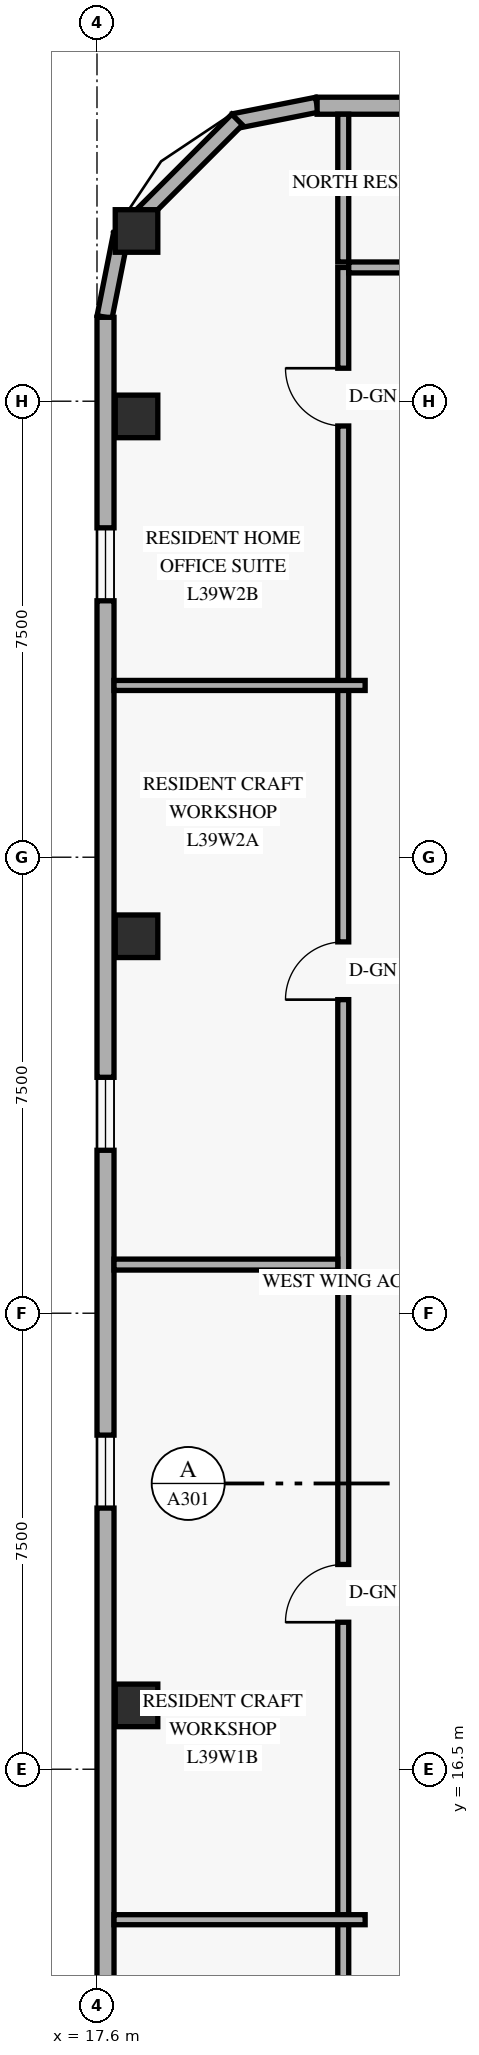
"""IFC4 building model, lengths in metres.
Left out: names, types, materials, properties, quantities, classifications, styles, units other than length and angle.
Written with IfcOpenShell. Run it as: python <this file> out.ifc"""

import sys

from ifc_helpers import new_model, si_unit, direction, frame, frame_2d, origin, origin_2d, place, context, subcontext, project, spatial, rectangle, extrude, element, fill, save


model = new_model("IFC4")
c1 = context("Model", 3, precision=1e-05, world=origin(), true_north=direction((0.0, 1.0)))
c2 = subcontext(c1, "Body", "Model", "MODEL_VIEW")
j1 = project(units=[si_unit("LENGTHUNIT", "METRE"), si_unit("PLANEANGLEUNIT", "RADIAN")], contexts=[c1])
p1 = place(None, origin())
s1 = spatial("IfcSite", under=j1, at=p1, CompositionType="ELEMENT")
p2 = place(p1, origin())
s2 = spatial("IfcBuilding", under=s1, at=p2, CompositionType="ELEMENT")
p3 = place(p2, frame((0.0, 0.0, 151.8)))
s3 = spatial("IfcBuildingStorey", under=s2, at=p3, CompositionType="ELEMENT", Elevation=151.8)
for number, where, z_axis, x_axis in (
    (1, (18.25, 17.55, 0.0), (0.0, 0.0, 1.0), (1.0, 0.0, 0.0)),
    (2, (18.25, 30.2, 0.0), (0.0, 0.0, 1.0), (1.0, 0.0, 0.0)),
    (3, (18.25, 38.75, 0.0), (0.0, 0.0, 1.0), (1.0, 0.0, 0.0)),
    (4, (18.25, 41.8, 0.0), (0.0, 0.0, 1.0), (1.0, 0.0, 0.0)),
):
    element("IfcColumn", number, at=place(p3, frame(where, z_axis=z_axis, x_axis=x_axis)), inside=s3, PredefinedType="COLUMN", context=c2, shape_type="SweptSolid", body=[
        extrude(rectangle(XDim=0.7, YDim=0.7, at=origin_2d()), origin(), (0.0, 0.0, 1.0), 3.6),
    ])
p4 = place(p3, frame((21.217, 43.876, 0.0), z_axis=(0.0, 0.0, 1.0), x_axis=(-0.980809899341, -0.19496651342, 0.0)))
e5 = element("IfcWall", 5, at=p4, inside=s3, PredefinedType="SOLIDWALL", context=c2, shape_type="SweptSolid", body=[
    extrude(rectangle(XDim=1.389, YDim=0.25, at=frame_2d((0.694, 0.0))), origin(), (0.0, 0.0, 1.0), 3.36),
])
p5 = place(p3, frame((19.905, 43.632, 0.0), z_axis=(0.0, 0.0, 1.0), x_axis=(-0.707106781187, -0.707106781187, 0.0)))
e6 = element("IfcWall", 6, at=p5, inside=s3, PredefinedType="SOLIDWALL", context=c2, shape_type="SweptSolid", body=[
    extrude(rectangle(XDim=2.739, YDim=0.25, at=frame_2d((1.37, 0.0))), origin(), (0.0, 0.0, 1.0), 3.36),
])
p6 = place(p3, frame((17.995, 41.746, 0.0), z_axis=(0.0, 0.0, 1.0), x_axis=(-0.195135625965, -0.9807762678, 0.0)))
e7 = element("IfcWall", 7, at=p6, inside=s3, PredefinedType="SOLIDWALL", context=c2, shape_type="SweptSolid", body=[
    extrude(rectangle(XDim=1.389, YDim=0.25, at=frame_2d((0.694, 0.0))), origin(), (0.0, 0.0, 1.0), 3.36),
])
p7 = place(p3, frame((54.98, 43.86, 0.0), z_axis=(0.0, 0.0, 1.0), x_axis=(-1.0, 0.0, 0.0)))
e8 = element("IfcWall", 8, at=p7, inside=s3, PredefinedType="SOLIDWALL", context=c2, shape_type="SweptSolid", body=[
    extrude(rectangle(XDim=33.76, YDim=0.28, at=frame_2d((16.88, 0.0))), origin(), (0.0, 0.0, 1.0), 3.36),
])
p8 = place(p7, frame((28.055, 0.0, 0.85)))
e9 = element("IfcOpeningElement", 9, at=p8, cuts=e8, PredefinedType="OPENING", context=c2, shape_type="SweptSolid", body=[
    extrude(rectangle(XDim=1.8, YDim=1.6, at=frame_2d((0.9, 0.8))), frame((0.0, 0.15, 0.0), z_axis=(0.0, -1.0, 0.0), x_axis=(1.0, 0.0, 0.0)), (0.0, 0.0, 1.0), 0.3),
])
p9 = place(p7, frame((21.17, 0.0, 0.85)))
e10 = element("IfcOpeningElement", 10, at=p9, cuts=e8, PredefinedType="OPENING", context=c2, shape_type="SweptSolid", body=[
    extrude(rectangle(XDim=1.8, YDim=1.6, at=frame_2d((0.9, 0.8))), frame((0.0, 0.15, 0.0), z_axis=(0.0, -1.0, 0.0), x_axis=(1.0, 0.0, 0.0)), (0.0, 0.0, 1.0), 0.3),
])
p10 = place(p7, frame((14.865, 0.0, 0.85)))
e11 = element("IfcOpeningElement", 11, at=p10, cuts=e8, PredefinedType="OPENING", context=c2, shape_type="SweptSolid", body=[
    extrude(rectangle(XDim=1.8, YDim=1.6, at=frame_2d((0.9, 0.8))), frame((0.0, 0.15, 0.0), z_axis=(0.0, -1.0, 0.0), x_axis=(1.0, 0.0, 0.0)), (0.0, 0.0, 1.0), 0.3),
])
p11 = place(p7, frame((8.575, 0.0, 0.85)))
e12 = element("IfcOpeningElement", 12, at=p11, cuts=e8, PredefinedType="OPENING", context=c2, shape_type="SweptSolid", body=[
    extrude(rectangle(XDim=1.8, YDim=1.6, at=frame_2d((0.9, 0.8))), frame((0.0, 0.15, 0.0), z_axis=(0.0, -1.0, 0.0), x_axis=(1.0, 0.0, 0.0)), (0.0, 0.0, 1.0), 0.3),
])
p12 = place(p7, frame((5.48, 0.0, 0.85)))
e13 = element("IfcOpeningElement", 13, at=p12, cuts=e8, PredefinedType="OPENING", context=c2, shape_type="SweptSolid", body=[
    extrude(rectangle(XDim=1.2, YDim=1.5, at=frame_2d((0.6, 0.75))), frame((0.0, 0.15, 0.0), z_axis=(0.0, -1.0, 0.0), x_axis=(1.0, 0.0, 0.0)), (0.0, 0.0, 1.0), 0.3),
])
p13 = place(p7, frame((1.69, 0.0, 0.85)))
e14 = element("IfcOpeningElement", 14, at=p13, cuts=e8, PredefinedType="OPENING", context=c2, shape_type="SweptSolid", body=[
    extrude(rectangle(XDim=1.8, YDim=1.6, at=frame_2d((0.9, 0.8))), frame((0.0, 0.15, 0.0), z_axis=(0.0, -1.0, 0.0), x_axis=(1.0, 0.0, 0.0)), (0.0, 0.0, 1.0), 0.3),
])
p14 = place(p3, frame((17.74, 40.38, 0.0), z_axis=(0.0, 0.0, 1.0), x_axis=(0.0, -1.0, 0.0)))
e15 = element("IfcWall", 15, at=p14, inside=s3, PredefinedType="SOLIDWALL", context=c2, shape_type="SweptSolid", body=[
    extrude(rectangle(XDim=32.76, YDim=0.28, at=frame_2d((16.38, 0.0))), origin(), (0.0, 0.0, 1.0), 3.36),
])
p15 = place(p14, frame((27.923, 0.0, 0.85)))
e16 = element("IfcOpeningElement", 16, at=p15, cuts=e15, PredefinedType="OPENING", context=c2, shape_type="SweptSolid", body=[
    extrude(rectangle(XDim=1.2, YDim=1.5, at=frame_2d((0.6, 0.75))), frame((0.0, 0.15, 0.0), z_axis=(0.0, -1.0, 0.0), x_axis=(1.0, 0.0, 0.0)), (0.0, 0.0, 1.0), 0.3),
])
p16 = place(p14, frame((18.385, 0.0, 0.85)))
e17 = element("IfcOpeningElement", 17, at=p16, cuts=e15, PredefinedType="OPENING", context=c2, shape_type="SweptSolid", body=[
    extrude(rectangle(XDim=1.2, YDim=1.5, at=frame_2d((0.6, 0.75))), frame((0.0, 0.15, 0.0), z_axis=(0.0, -1.0, 0.0), x_axis=(1.0, 0.0, 0.0)), (0.0, 0.0, 1.0), 0.3),
])
p17 = place(p14, frame((12.5, 0.0, 0.85)))
e18 = element("IfcOpeningElement", 18, at=p17, cuts=e15, PredefinedType="OPENING", context=c2, shape_type="SweptSolid", body=[
    extrude(rectangle(XDim=1.2, YDim=1.5, at=frame_2d((0.6, 0.75))), frame((0.0, 0.15, 0.0), z_axis=(0.0, -1.0, 0.0), x_axis=(1.0, 0.0, 0.0)), (0.0, 0.0, 1.0), 0.3),
])
p18 = place(p14, frame((3.462, 0.0, 0.85)))
e19 = element("IfcOpeningElement", 19, at=p18, cuts=e15, PredefinedType="OPENING", context=c2, shape_type="SweptSolid", body=[
    extrude(rectangle(XDim=1.2, YDim=1.5, at=frame_2d((0.6, 0.75))), frame((0.0, 0.15, 0.0), z_axis=(0.0, -1.0, 0.0), x_axis=(1.0, 0.0, 0.0)), (0.0, 0.0, 1.0), 0.3),
])
p19 = place(p3, frame((21.65, 6.8, 0.0), z_axis=(0.0, 0.0, 1.0), x_axis=(0.0, 1.0, 0.0)))
e20 = element("IfcWall", 20, at=p19, inside=s3, PredefinedType="STANDARD", context=c2, shape_type="SweptSolid", body=[
    extrude(rectangle(XDim=34.4, YDim=0.18, at=frame_2d((17.2, 0.0))), origin(), (0.0, 0.0, 1.0), 2.73),
])
p20 = place(p19, frame((1.883, 0.0, 0.0)))
e21 = element("IfcOpeningElement", 21, at=p20, cuts=e20, PredefinedType="OPENING", context=c2, shape_type="SweptSolid", body=[
    extrude(rectangle(XDim=0.95, YDim=2.15, at=frame_2d((0.475, 1.075))), frame((0.0, 0.1, 0.0), z_axis=(0.0, -1.0, 0.0), x_axis=(1.0, 0.0, 0.0)), (0.0, 0.0, 1.0), 0.2),
])
p21 = place(p19, frame((12.117, 0.0, 0.0)))
e22 = element("IfcOpeningElement", 22, at=p21, cuts=e20, PredefinedType="OPENING", context=c2, shape_type="SweptSolid", body=[
    extrude(rectangle(XDim=0.95, YDim=2.15, at=frame_2d((0.475, 1.075))), frame((0.0, 0.1, 0.0), z_axis=(0.0, -1.0, 0.0), x_axis=(1.0, 0.0, 0.0)), (0.0, 0.0, 1.0), 0.2),
])
p22 = place(p19, frame((22.357, 0.0, 0.0)))
e23 = element("IfcOpeningElement", 23, at=p22, cuts=e20, PredefinedType="OPENING", context=c2, shape_type="SweptSolid", body=[
    extrude(rectangle(XDim=0.95, YDim=2.15, at=frame_2d((0.475, 1.075))), frame((0.0, 0.1, 0.0), z_axis=(0.0, -1.0, 0.0), x_axis=(1.0, 0.0, 0.0)), (0.0, 0.0, 1.0), 0.2),
])
p23 = place(p19, frame((31.792, 0.0, 0.0)))
e24 = element("IfcOpeningElement", 24, at=p23, cuts=e20, PredefinedType="OPENING", context=c2, shape_type="SweptSolid", body=[
    extrude(rectangle(XDim=0.95, YDim=2.15, at=frame_2d((0.475, 1.075))), frame((0.0, 0.1, 0.0), z_axis=(0.0, -1.0, 0.0), x_axis=(1.0, 0.0, 0.0)), (0.0, 0.0, 1.0), 0.2),
])
p24 = place(p3, frame((21.74, 41.2, 0.0), z_axis=(0.0, 0.0, 1.0), x_axis=(1.0, 0.0, 0.0)))
e25 = element("IfcWall", 25, at=p24, inside=s3, PredefinedType="STANDARD", context=c2, shape_type="SweptSolid", body=[
    extrude(rectangle(XDim=13.68, YDim=0.18, at=frame_2d((6.84, 0.0))), origin(), (0.0, 0.0, 1.0), 2.73),
])
p25 = place(p24, frame((2.95, 0.0, 0.0)))
e26 = element("IfcOpeningElement", 26, at=p25, cuts=e25, PredefinedType="OPENING", context=c2, shape_type="SweptSolid", body=[
    extrude(rectangle(XDim=0.95, YDim=2.15, at=frame_2d((0.475, 1.075))), frame((0.0, 0.1, 0.0), z_axis=(0.0, -1.0, 0.0), x_axis=(1.0, 0.0, 0.0)), (0.0, 0.0, 1.0), 0.2),
])
p26 = place(p24, frame((10.11, 0.0, 0.0)))
e27 = element("IfcOpeningElement", 27, at=p26, cuts=e25, PredefinedType="OPENING", context=c2, shape_type="SweptSolid", body=[
    extrude(rectangle(XDim=0.95, YDim=2.15, at=frame_2d((0.475, 1.075))), frame((0.0, 0.1, 0.0), z_axis=(0.0, -1.0, 0.0), x_axis=(1.0, 0.0, 0.0)), (0.0, 0.0, 1.0), 0.2),
])
p27 = place(p3, frame((21.65, 41.29, 0.0), z_axis=(0.0, 0.0, 1.0), x_axis=(0.0, 1.0, 0.0)))
e28 = element("IfcWall", 28, at=p27, inside=s3, PredefinedType="PARTITIONING", context=c2, shape_type="SweptSolid", body=[
    extrude(rectangle(XDim=2.43, YDim=0.18, at=frame_2d((1.215, 0.0))), origin(), (0.0, 0.0, 1.0), 2.879),
])
p28 = place(p3, frame((17.88, 14.025, 0.0), z_axis=(0.0, 0.0, 1.0), x_axis=(1.0, 0.0, 0.0)))
e29 = element("IfcWall", 29, at=p28, inside=s3, PredefinedType="PARTITIONING", context=c2, shape_type="SweptSolid", body=[
    extrude(rectangle(XDim=4.13, YDim=0.165, at=frame_2d((2.065, 0.0))), origin(), (0.0, 0.0, 1.0), 2.879),
])
p29 = place(p3, frame((17.88, 24.8, 0.0), z_axis=(0.0, 0.0, 1.0), x_axis=(1.0, 0.0, 0.0)))
e30 = element("IfcWall", 30, at=p29, inside=s3, PredefinedType="PARTITIONING", context=c2, shape_type="SweptSolid", body=[
    extrude(rectangle(XDim=3.68, YDim=0.18, at=frame_2d((1.84, 0.0))), origin(), (0.0, 0.0, 1.0), 2.879),
])
p30 = place(p3, frame((17.88, 34.325, 0.0), z_axis=(0.0, 0.0, 1.0), x_axis=(1.0, 0.0, 0.0)))
e31 = element("IfcWall", 31, at=p30, inside=s3, PredefinedType="PARTITIONING", context=c2, shape_type="SweptSolid", body=[
    extrude(rectangle(XDim=4.13, YDim=0.165, at=frame_2d((2.065, 0.0))), origin(), (0.0, 0.0, 1.0), 2.879),
])
p31 = place(p16, origin())
e32 = element("IfcWindow", 32, at=p31, inside=s3, PartitioningType="SINGLE_PANEL", PredefinedType="WINDOW", context=c2, shape_type="SweptSolid", body=[
    extrude(rectangle(XDim=1.2, YDim=1.5, at=frame_2d((0.6, 0.75))), frame((0.0, 0.03, 0.0), z_axis=(0.0, -1.0, 0.0), x_axis=(1.0, 0.0, 0.0)), (0.0, 0.0, 1.0), 0.06),
])
fill(e17, e32)
p32 = place(p17, origin())
e33 = element("IfcWindow", 33, at=p32, inside=s3, PartitioningType="SINGLE_PANEL", PredefinedType="WINDOW", context=c2, shape_type="SweptSolid", body=[
    extrude(rectangle(XDim=1.2, YDim=1.5, at=frame_2d((0.6, 0.75))), frame((0.0, 0.03, 0.0), z_axis=(0.0, -1.0, 0.0), x_axis=(1.0, 0.0, 0.0)), (0.0, 0.0, 1.0), 0.06),
])
fill(e18, e33)
p33 = place(p18, origin())
e34 = element("IfcWindow", 34, at=p33, inside=s3, PartitioningType="SINGLE_PANEL", PredefinedType="WINDOW", context=c2, shape_type="SweptSolid", body=[
    extrude(rectangle(XDim=1.2, YDim=1.5, at=frame_2d((0.6, 0.75))), frame((0.0, 0.03, 0.0), z_axis=(0.0, -1.0, 0.0), x_axis=(1.0, 0.0, 0.0)), (0.0, 0.0, 1.0), 0.06),
])
fill(e19, e34)
p34 = place(p21, origin())
e35 = element("IfcDoor", 35, at=p34, inside=s3, OperationType="SINGLE_SWING_LEFT", PredefinedType="DOOR", context=c2, shape_type="SweptSolid", body=[
    extrude(rectangle(XDim=0.95, YDim=2.15, at=frame_2d((0.475, 1.075))), frame((0.0, 0.025, 0.0), z_axis=(0.0, -1.0, 0.0), x_axis=(1.0, 0.0, 0.0)), (0.0, 0.0, 1.0), 0.05),
])
fill(e22, e35)
p35 = place(p22, origin())
e36 = element("IfcDoor", 36, at=p35, inside=s3, OperationType="SINGLE_SWING_LEFT", PredefinedType="DOOR", context=c2, shape_type="SweptSolid", body=[
    extrude(rectangle(XDim=0.95, YDim=2.15, at=frame_2d((0.475, 1.075))), frame((0.0, 0.025, 0.0), z_axis=(0.0, -1.0, 0.0), x_axis=(1.0, 0.0, 0.0)), (0.0, 0.0, 1.0), 0.05),
])
fill(e23, e36)
p36 = place(p23, origin())
e37 = element("IfcDoor", 37, at=p36, inside=s3, OperationType="SINGLE_SWING_RIGHT", PredefinedType="DOOR", context=c2, shape_type="SweptSolid", body=[
    extrude(rectangle(XDim=0.95, YDim=2.15, at=frame_2d((0.475, 1.075))), frame((0.0, 0.025, 0.0), z_axis=(0.0, -1.0, 0.0), x_axis=(1.0, 0.0, 0.0)), (0.0, 0.0, 1.0), 0.05),
])
fill(e24, e37)
save(model, sys.argv[1])
